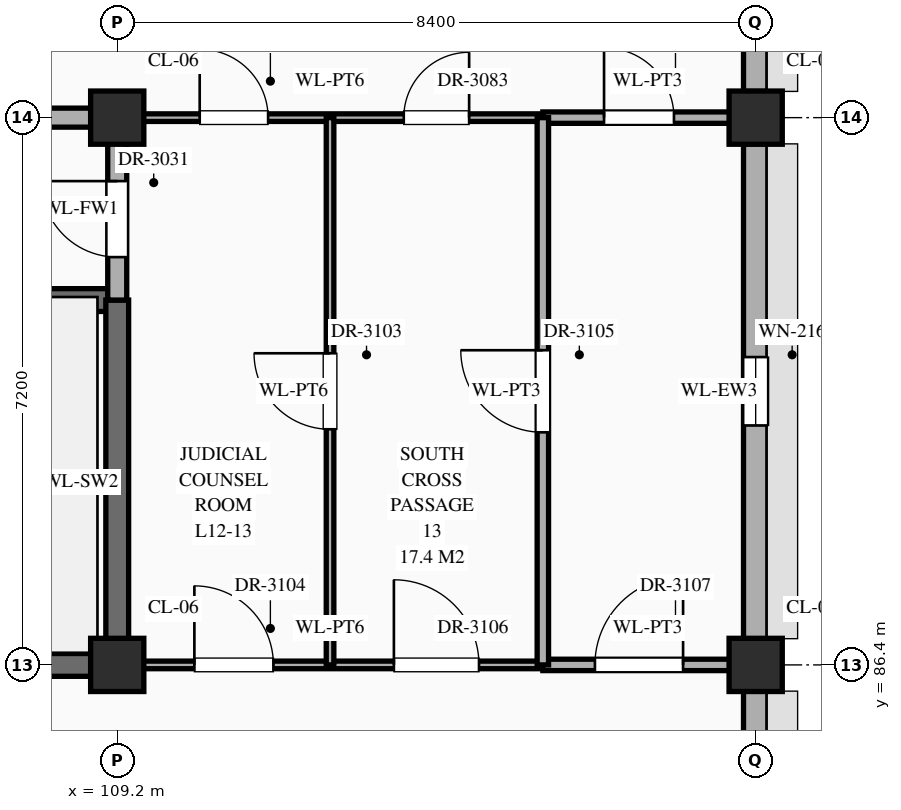
"""IFC4 building model, lengths in metres.
Left out: names, types, materials, properties, quantities, classifications, styles, units other than length and angle.
Written with IfcOpenShell. Run it as: python <this file> out.ifc"""

import sys

from ifc_helpers import new_model, si_unit, direction, frame, frame_2d, origin, origin_2d, place, context, subcontext, project, spatial, rectangle, extrude, element, fill, save


model = new_model("IFC4")
c1 = context("Model", 3, precision=1e-05, world=origin(), true_north=direction((0.0, 1.0)))
c2 = subcontext(c1, "Body", "Model", "MODEL_VIEW")
j1 = project(units=[si_unit("LENGTHUNIT", "METRE"), si_unit("PLANEANGLEUNIT", "RADIAN")], contexts=[c1])
p1 = place(None, origin())
s1 = spatial("IfcSite", under=j1, at=p1, CompositionType="ELEMENT")
p2 = place(p1, origin())
s2 = spatial("IfcBuilding", under=s1, at=p2, CompositionType="ELEMENT")
p3 = place(p2, frame((0.0, 0.0, 51.9)))
s3 = spatial("IfcBuildingStorey", under=s2, at=p3, CompositionType="ELEMENT", Elevation=51.9)
for number, where, z_axis, x_axis in (
    (1, (109.2, 86.4, 0.0), (0.0, 0.0, 1.0), (1.0, 0.0, 0.0)),
    (2, (109.2, 93.6, 0.0), (0.0, 0.0, 1.0), (1.0, 0.0, 0.0)),
    (3, (117.6, 86.4, 0.0), (0.0, 0.0, 1.0), (1.0, 0.0, 0.0)),
    (4, (117.6, 93.6, 0.0), (0.0, 0.0, 1.0), (1.0, 0.0, 0.0)),
):
    element("IfcColumn", number, at=place(p3, frame(where, z_axis=z_axis, x_axis=x_axis)), inside=s3, PredefinedType="COLUMN", context=c2, shape_type="SweptSolid", body=[
        extrude(rectangle(XDim=0.7, YDim=0.7, at=origin_2d()), origin(), (0.0, 0.0, 1.0), 4.2),
    ])
p4 = place(p3, frame((117.6, 79.545, 0.0), z_axis=(0.0, 0.0, 1.0), x_axis=(0.0, 1.0, 0.0)))
e5 = element("IfcWall", 5, at=p4, inside=s3, PredefinedType="STANDARD", context=c2, shape_type="SweptSolid", body=[
    extrude(rectangle(XDim=6.51, YDim=0.32, at=frame_2d((3.255, 0.0))), origin(), (0.0, 0.0, 1.0), 3.31),
])
p5 = place(p4, frame((1.455, 0.0, 0.55)))
e6 = element("IfcOpeningElement", 6, at=p5, cuts=e5, PredefinedType="OPENING", context=c2, shape_type="SweptSolid", body=[
    extrude(rectangle(XDim=1.2, YDim=1.38, at=frame_2d((0.6, 0.69))), frame((0.0, 0.172, 0.0), z_axis=(0.0, -1.0, 0.0), x_axis=(1.0, 0.0, 0.0)), (0.0, 0.0, 1.0), 0.344),
])
p6 = place(p3, frame((117.6, 86.745, 0.0), z_axis=(0.0, 0.0, 1.0), x_axis=(0.0, 1.0, 0.0)))
e7 = element("IfcWall", 7, at=p6, inside=s3, PredefinedType="STANDARD", context=c2, shape_type="SweptSolid", body=[
    extrude(rectangle(XDim=6.51, YDim=0.32, at=frame_2d((3.255, 0.0))), origin(), (0.0, 0.0, 1.0), 3.31),
])
p7 = place(p6, frame((2.805, 0.0, 0.55)))
e8 = element("IfcOpeningElement", 8, at=p7, cuts=e7, PredefinedType="OPENING", context=c2, shape_type="SweptSolid", body=[
    extrude(rectangle(XDim=0.9, YDim=1.56, at=frame_2d((0.45, 0.78))), frame((0.0, 0.172, 0.0), z_axis=(0.0, -1.0, 0.0), x_axis=(1.0, 0.0, 0.0)), (0.0, 0.0, 1.0), 0.344),
])
p8 = place(p3, frame((117.6, 93.945, 0.0), z_axis=(0.0, 0.0, 1.0), x_axis=(0.0, 1.0, 0.0)))
e9 = element("IfcWall", 9, at=p8, inside=s3, PredefinedType="STANDARD", context=c2, shape_type="SweptSolid", body=[
    extrude(rectangle(XDim=6.51, YDim=0.32, at=frame_2d((3.255, 0.0))), origin(), (0.0, 0.0, 1.0), 3.31),
])
p9 = place(p8, frame((3.78, 0.0, 0.55)))
e10 = element("IfcOpeningElement", 10, at=p9, cuts=e9, PredefinedType="OPENING", context=c2, shape_type="SweptSolid", body=[
    extrude(rectangle(XDim=1.55, YDim=1.74, at=frame_2d((0.775, 0.87))), frame((0.0, 0.172, 0.0), z_axis=(0.0, -1.0, 0.0), x_axis=(1.0, 0.0, 0.0)), (0.0, 0.0, 1.0), 0.344),
])
p10 = place(p3, frame((100.8, 86.4, 0.0), z_axis=(0.0, 0.0, 1.0), x_axis=(1.0, 0.0, 0.0)))
e11 = element("IfcWall", 11, at=p10, inside=s3, PredefinedType="SHEAR", context=c2, shape_type="SweptSolid", body=[
    extrude(rectangle(XDim=8.4, YDim=0.3, at=frame_2d((4.2, 0.0))), origin(), (0.0, 0.0, 1.0), 3.96),
])
p11 = place(p3, frame((109.2, 86.4, 0.0), z_axis=(0.0, 0.0, 1.0), x_axis=(1.0, 0.0, 0.0)))
e12 = element("IfcWall", 12, at=p11, inside=s3, PredefinedType="STANDARD", context=c2, shape_type="SweptSolid", body=[
    extrude(rectangle(XDim=5.6, YDim=0.1, at=frame_2d((2.8, 0.0))), origin(), (0.0, 0.0, 1.0), 3.11),
])
p12 = place(p11, frame((1.015, 0.0, 0.0)))
e13 = element("IfcOpeningElement", 13, at=p12, cuts=e12, PredefinedType="OPENING", context=c2, shape_type="SweptSolid", body=[
    extrude(rectangle(XDim=1.04, YDim=2.2, at=frame_2d((0.52, 1.1))), frame((0.0, 0.062, 0.0), z_axis=(0.0, -1.0, 0.0), x_axis=(1.0, 0.0, 0.0)), (0.0, 0.0, 1.0), 0.124),
])
p13 = place(p11, frame((3.64, 0.0, 0.0)))
e14 = element("IfcOpeningElement", 14, at=p13, cuts=e12, PredefinedType="OPENING", context=c2, shape_type="SweptSolid", body=[
    extrude(rectangle(XDim=1.12, YDim=2.25, at=frame_2d((0.56, 1.125))), frame((0.0, 0.062, 0.0), z_axis=(0.0, -1.0, 0.0), x_axis=(1.0, 0.0, 0.0)), (0.0, 0.0, 1.0), 0.124),
])
p14 = place(p3, frame((114.8, 86.4, 0.0), z_axis=(0.0, 0.0, 1.0), x_axis=(1.0, 0.0, 0.0)))
e15 = element("IfcWall", 15, at=p14, inside=s3, PredefinedType="STANDARD", context=c2, shape_type="SweptSolid", body=[
    extrude(rectangle(XDim=2.76, YDim=0.15, at=frame_2d((1.38, 0.0))), origin(), (0.0, 0.0, 1.0), 3.11),
])
p15 = place(p14, frame((0.685, 0.0, 0.0)))
e16 = element("IfcOpeningElement", 16, at=p15, cuts=e15, PredefinedType="OPENING", context=c2, shape_type="SweptSolid", body=[
    extrude(rectangle(XDim=1.16, YDim=2.3, at=frame_2d((0.58, 1.15))), frame((0.0, 0.087, 0.0), z_axis=(0.0, -1.0, 0.0), x_axis=(1.0, 0.0, 0.0)), (0.0, 0.0, 1.0), 0.174),
])
p16 = place(p3, frame((100.8, 91.2, 0.0), z_axis=(0.0, 0.0, 1.0), x_axis=(1.0, 0.0, 0.0)))
e17 = element("IfcWall", 17, at=p16, inside=s3, PredefinedType="SHEAR", context=c2, shape_type="SweptSolid", body=[
    extrude(rectangle(XDim=8.4, YDim=0.3, at=frame_2d((4.2, 0.0))), origin(), (0.0, 0.0, 1.0), 3.96),
])
p17 = place(p16, frame((0.65, 0.0, 0.0)))
e18 = element("IfcOpeningElement", 18, at=p17, cuts=e17, PredefinedType="OPENING", context=c2, shape_type="SweptSolid", body=[
    extrude(rectangle(XDim=1.1, YDim=2.2, at=frame_2d((0.55, 1.1))), frame((0.0, 0.162, 0.0), z_axis=(0.0, -1.0, 0.0), x_axis=(1.0, 0.0, 0.0)), (0.0, 0.0, 1.0), 0.324),
])
p18 = place(p3, frame((100.8, 93.6, 0.0), z_axis=(0.0, 0.0, 1.0), x_axis=(1.0, 0.0, 0.0)))
e19 = element("IfcWall", 19, at=p18, inside=s3, PredefinedType="STANDARD", context=c2, shape_type="SweptSolid", body=[
    extrude(rectangle(XDim=8.4, YDim=0.25, at=frame_2d((4.2, 0.0))), origin(), (0.0, 0.0, 1.0), 3.11),
])
p19 = place(p18, frame((3.3, 0.0, 0.0)))
e20 = element("IfcOpeningElement", 20, at=p19, cuts=e19, PredefinedType="OPENING", context=c2, shape_type="SweptSolid", body=[
    extrude(rectangle(XDim=1.8, YDim=2.35, at=frame_2d((0.9, 1.175))), frame((0.0, 0.137, 0.0), z_axis=(0.0, -1.0, 0.0), x_axis=(1.0, 0.0, 0.0)), (0.0, 0.0, 1.0), 0.274),
])
p20 = place(p3, frame((109.2, 93.6, 0.0), z_axis=(0.0, 0.0, 1.0), x_axis=(1.0, 0.0, 0.0)))
e21 = element("IfcWall", 21, at=p20, inside=s3, PredefinedType="STANDARD", context=c2, shape_type="SweptSolid", body=[
    extrude(rectangle(XDim=5.6, YDim=0.1, at=frame_2d((2.8, 0.0))), origin(), (0.0, 0.0, 1.0), 3.11),
])
p21 = place(p20, frame((1.085, 0.0, 0.0)))
e22 = element("IfcOpeningElement", 22, at=p21, cuts=e21, PredefinedType="OPENING", context=c2, shape_type="SweptSolid", body=[
    extrude(rectangle(XDim=0.9, YDim=2.15, at=frame_2d((0.45, 1.075))), frame((0.0, 0.062, 0.0), z_axis=(0.0, -1.0, 0.0), x_axis=(1.0, 0.0, 0.0)), (0.0, 0.0, 1.0), 0.124),
])
p22 = place(p20, frame((3.77, 0.0, 0.0)))
e23 = element("IfcOpeningElement", 23, at=p22, cuts=e21, PredefinedType="OPENING", context=c2, shape_type="SweptSolid", body=[
    extrude(rectangle(XDim=0.86, YDim=2.1, at=frame_2d((0.43, 1.05))), frame((0.0, 0.062, 0.0), z_axis=(0.0, -1.0, 0.0), x_axis=(1.0, 0.0, 0.0)), (0.0, 0.0, 1.0), 0.124),
])
p23 = place(p3, frame((114.8, 93.6, 0.0), z_axis=(0.0, 0.0, 1.0), x_axis=(1.0, 0.0, 0.0)))
e24 = element("IfcWall", 24, at=p23, inside=s3, PredefinedType="STANDARD", context=c2, shape_type="SweptSolid", body=[
    extrude(rectangle(XDim=2.76, YDim=0.15, at=frame_2d((1.38, 0.0))), origin(), (0.0, 0.0, 1.0), 3.11),
])
p24 = place(p23, frame((0.805, 0.0, 0.0)))
e25 = element("IfcOpeningElement", 25, at=p24, cuts=e24, PredefinedType="OPENING", context=c2, shape_type="SweptSolid", body=[
    extrude(rectangle(XDim=0.92, YDim=2.15, at=frame_2d((0.46, 1.075))), frame((0.0, 0.087, 0.0), z_axis=(0.0, -1.0, 0.0), x_axis=(1.0, 0.0, 0.0)), (0.0, 0.0, 1.0), 0.174),
])
p25 = place(p3, frame((109.2, 86.4, 0.0), z_axis=(0.0, 0.0, 1.0), x_axis=(0.0, 1.0, 0.0)))
e26 = element("IfcWall", 26, at=p25, inside=s3, PredefinedType="SHEAR", context=c2, shape_type="SweptSolid", body=[
    extrude(rectangle(XDim=4.8, YDim=0.3, at=frame_2d((2.4, 0.0))), origin(), (0.0, 0.0, 1.0), 3.96),
])
p26 = place(p3, frame((109.2, 91.2, 0.0), z_axis=(0.0, 0.0, 1.0), x_axis=(0.0, 1.0, 0.0)))
e27 = element("IfcWall", 27, at=p26, inside=s3, PredefinedType="STANDARD", context=c2, shape_type="SweptSolid", body=[
    extrude(rectangle(XDim=2.4, YDim=0.25, at=frame_2d((1.2, 0.0))), origin(), (0.0, 0.0, 1.0), 3.21),
])
p27 = place(p26, frame((0.565, 0.0, 0.0)))
e28 = element("IfcOpeningElement", 28, at=p27, cuts=e27, PredefinedType="OPENING", context=c2, shape_type="SweptSolid", body=[
    extrude(rectangle(XDim=1.0, YDim=2.2, at=frame_2d((0.5, 1.1))), frame((0.0, 0.137, 0.0), z_axis=(0.0, -1.0, 0.0), x_axis=(1.0, 0.0, 0.0)), (0.0, 0.0, 1.0), 0.274),
])
p28 = place(p3, frame((112.0, 86.4, 0.0), z_axis=(0.0, 0.0, 1.0), x_axis=(0.0, 1.0, 0.0)))
e29 = element("IfcWall", 29, at=p28, inside=s3, PredefinedType="STANDARD", context=c2, shape_type="SweptSolid", body=[
    extrude(rectangle(XDim=7.2, YDim=0.1, at=frame_2d((3.6, 0.0))), origin(), (0.0, 0.0, 1.0), 3.96),
])
p29 = place(p28, frame((3.1, 0.0, 0.0)))
e30 = element("IfcOpeningElement", 30, at=p29, cuts=e29, PredefinedType="OPENING", context=c2, shape_type="SweptSolid", body=[
    extrude(rectangle(XDim=1.0, YDim=2.25, at=frame_2d((0.5, 1.125))), frame((0.0, 0.062, 0.0), z_axis=(0.0, -1.0, 0.0), x_axis=(1.0, 0.0, 0.0)), (0.0, 0.0, 1.0), 0.124),
])
p30 = place(p3, frame((114.8, 86.4, 0.0), z_axis=(0.0, 0.0, 1.0), x_axis=(0.0, 1.0, 0.0)))
e31 = element("IfcWall", 31, at=p30, inside=s3, PredefinedType="STANDARD", context=c2, shape_type="SweptSolid", body=[
    extrude(rectangle(XDim=7.2, YDim=0.15, at=frame_2d((3.6, 0.0))), origin(), (0.0, 0.0, 1.0), 3.96),
])
p31 = place(p30, frame((3.06, 0.0, 0.0)))
e32 = element("IfcOpeningElement", 32, at=p31, cuts=e31, PredefinedType="OPENING", context=c2, shape_type="SweptSolid", body=[
    extrude(rectangle(XDim=1.08, YDim=2.25, at=frame_2d((0.54, 1.125))), frame((0.0, 0.087, 0.0), z_axis=(0.0, -1.0, 0.0), x_axis=(1.0, 0.0, 0.0)), (0.0, 0.0, 1.0), 0.174),
])
p32 = place(p7, origin())
e33 = element("IfcWindow", 33, at=p32, inside=s3, PartitioningType="SINGLE_PANEL", PredefinedType="WINDOW", context=c2, shape_type="SweptSolid", body=[
    extrude(rectangle(XDim=0.9, YDim=1.56, at=frame_2d((0.45, 0.78))), frame((0.0, 0.03, 0.0), z_axis=(0.0, -1.0, 0.0), x_axis=(1.0, 0.0, 0.0)), (0.0, 0.0, 1.0), 0.06),
])
fill(e8, e33)
p33 = place(p27, origin())
e34 = element("IfcDoor", 34, at=p33, inside=s3, OperationType="SINGLE_SWING_RIGHT", PredefinedType="DOOR", context=c2, shape_type="SweptSolid", body=[
    extrude(rectangle(XDim=1.0, YDim=2.2, at=frame_2d((0.5, 1.1))), frame((0.0, 0.025, 0.0), z_axis=(0.0, -1.0, 0.0), x_axis=(1.0, 0.0, 0.0)), (0.0, 0.0, 1.0), 0.05),
])
fill(e28, e34)
p34 = place(p21, origin())
e35 = element("IfcDoor", 35, at=p34, inside=s3, OperationType="SINGLE_SWING_LEFT", PredefinedType="DOOR", context=c2, shape_type="SweptSolid", body=[
    extrude(rectangle(XDim=0.9, YDim=2.15, at=frame_2d((0.45, 1.075))), frame((0.0, 0.025, 0.0), z_axis=(0.0, -1.0, 0.0), x_axis=(1.0, 0.0, 0.0)), (0.0, 0.0, 1.0), 0.05),
])
fill(e22, e35)
p35 = place(p22, origin())
e36 = element("IfcDoor", 36, at=p35, inside=s3, OperationType="SINGLE_SWING_RIGHT", PredefinedType="DOOR", context=c2, shape_type="SweptSolid", body=[
    extrude(rectangle(XDim=0.86, YDim=2.1, at=frame_2d((0.43, 1.05))), frame((0.0, 0.025, 0.0), z_axis=(0.0, -1.0, 0.0), x_axis=(1.0, 0.0, 0.0)), (0.0, 0.0, 1.0), 0.05),
])
fill(e23, e36)
p36 = place(p24, origin())
e37 = element("IfcDoor", 37, at=p36, inside=s3, OperationType="SINGLE_SWING_LEFT", PredefinedType="DOOR", context=c2, shape_type="SweptSolid", body=[
    extrude(rectangle(XDim=0.92, YDim=2.15, at=frame_2d((0.46, 1.075))), frame((0.0, 0.025, 0.0), z_axis=(0.0, -1.0, 0.0), x_axis=(1.0, 0.0, 0.0)), (0.0, 0.0, 1.0), 0.05),
])
fill(e25, e37)
p37 = place(p29, origin())
e38 = element("IfcDoor", 38, at=p37, inside=s3, OperationType="SINGLE_SWING_RIGHT", PredefinedType="DOOR", context=c2, shape_type="SweptSolid", body=[
    extrude(rectangle(XDim=1.0, YDim=2.25, at=frame_2d((0.5, 1.125))), frame((0.0, 0.025, 0.0), z_axis=(0.0, -1.0, 0.0), x_axis=(1.0, 0.0, 0.0)), (0.0, 0.0, 1.0), 0.05),
])
fill(e30, e38)
p38 = place(p12, origin())
e39 = element("IfcDoor", 39, at=p38, inside=s3, OperationType="SINGLE_SWING_LEFT", PredefinedType="DOOR", context=c2, shape_type="SweptSolid", body=[
    extrude(rectangle(XDim=1.04, YDim=2.2, at=frame_2d((0.52, 1.1))), frame((0.0, 0.025, 0.0), z_axis=(0.0, -1.0, 0.0), x_axis=(1.0, 0.0, 0.0)), (0.0, 0.0, 1.0), 0.05),
])
fill(e13, e39)
p39 = place(p31, origin())
e40 = element("IfcDoor", 40, at=p39, inside=s3, OperationType="SINGLE_SWING_RIGHT", PredefinedType="DOOR", context=c2, shape_type="SweptSolid", body=[
    extrude(rectangle(XDim=1.08, YDim=2.25, at=frame_2d((0.54, 1.125))), frame((0.0, 0.025, 0.0), z_axis=(0.0, -1.0, 0.0), x_axis=(1.0, 0.0, 0.0)), (0.0, 0.0, 1.0), 0.05),
])
fill(e32, e40)
p40 = place(p13, origin())
e41 = element("IfcDoor", 41, at=p40, inside=s3, OperationType="SINGLE_SWING_LEFT", PredefinedType="DOOR", context=c2, shape_type="SweptSolid", body=[
    extrude(rectangle(XDim=1.12, YDim=2.25, at=frame_2d((0.56, 1.125))), frame((0.0, 0.025, 0.0), z_axis=(0.0, -1.0, 0.0), x_axis=(1.0, 0.0, 0.0)), (0.0, 0.0, 1.0), 0.05),
])
fill(e14, e41)
p41 = place(p15, origin())
e42 = element("IfcDoor", 42, at=p41, inside=s3, OperationType="SINGLE_SWING_RIGHT", PredefinedType="DOOR", context=c2, shape_type="SweptSolid", body=[
    extrude(rectangle(XDim=1.16, YDim=2.3, at=frame_2d((0.58, 1.15))), frame((0.0, 0.025, 0.0), z_axis=(0.0, -1.0, 0.0), x_axis=(1.0, 0.0, 0.0)), (0.0, 0.0, 1.0), 0.05),
])
fill(e16, e42)
save(model, sys.argv[1])
